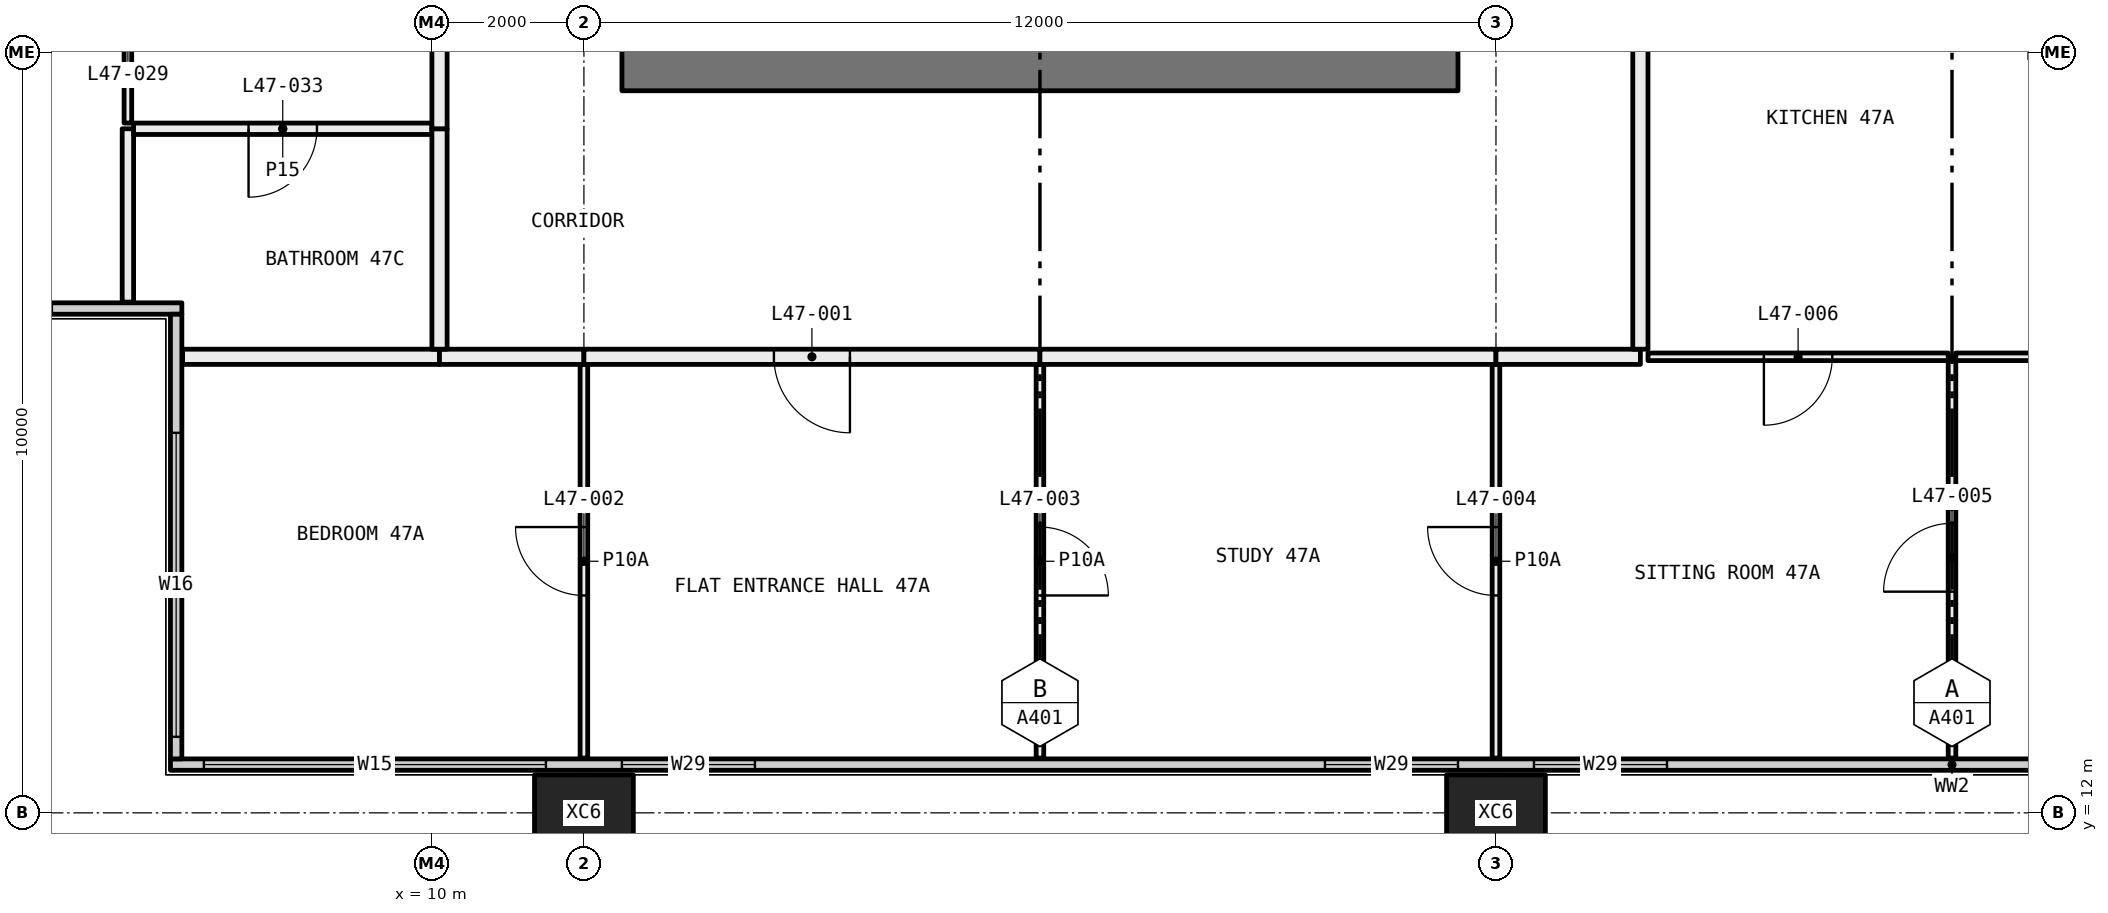
"""IFC4 building model, lengths in metres.
Left out: names, types, materials, properties, quantities, classifications, styles, units other than length and angle.
Written with IfcOpenShell. Run it as: python <this file> out.ifc"""

import sys

from ifc_helpers import new_model, si_unit, direction, frame, frame_2d, origin, origin_2d, place, context, subcontext, project, spatial, rectangle, hollow_rectangle, extrude, element, fill, save


model = new_model("IFC4")
c1 = context("Model", 3, precision=1e-05, world=origin(), true_north=direction((0.0, 1.0)))
c2 = subcontext(c1, "Body", "Model", "MODEL_VIEW")
j1 = project(units=[si_unit("LENGTHUNIT", "METRE"), si_unit("PLANEANGLEUNIT", "RADIAN")], contexts=[c1])
p1 = place(None, origin())
s1 = spatial("IfcSite", under=j1, at=p1, CompositionType="ELEMENT")
p2 = place(p1, origin())
s2 = spatial("IfcBuilding", under=s1, at=p2, CompositionType="ELEMENT")
p3 = place(p2, frame((0.0, 0.0, 178.95)))
s3 = spatial("IfcBuildingStorey", under=s2, at=p3, CompositionType="ELEMENT", Elevation=178.95)
for number, where, z_axis, x_axis in (
    (1, (12.0, 12.0, -0.4), (0.0, 0.0, 1.0), (1.0, 0.0, 0.0)),
    (2, (24.0, 12.0, -0.4), (0.0, 0.0, 1.0), (1.0, 0.0, 0.0)),
):
    element("IfcColumn", number, at=place(p3, frame(where, z_axis=z_axis, x_axis=x_axis)), inside=s3, PredefinedType="COLUMN", context=c2, shape_type="SweptSolid", body=[
        extrude(hollow_rectangle(XDim=1.3, YDim=1.0, WallThickness=0.05, at=origin_2d()), origin(), (0.0, 0.0, 1.0), 3.45),
    ])
p4 = place(p3, frame((6.56, 12.635, 0.0), z_axis=(0.0, 0.0, 1.0), x_axis=(1.0, 0.0, 0.0)))
e3 = element("IfcWall", 3, at=p4, inside=s3, PredefinedType="ELEMENTEDWALL", context=c2, shape_type="SweptSolid", body=[
    extrude(rectangle(XDim=46.88, YDim=0.15, at=frame_2d((23.44, 0.0))), origin(), (0.0, 0.0, 1.0), 3.05),
])
p5 = place(p4, frame((0.44, 0.0, 0.45)))
e4 = element("IfcOpeningElement", 4, at=p5, cuts=e3, PredefinedType="OPENING", context=c2, shape_type="SweptSolid", body=[
    extrude(rectangle(XDim=4.5, YDim=2.55, at=frame_2d((2.25, 1.275))), frame((0.0, 0.085, 0.0), z_axis=(0.0, -1.0, 0.0), x_axis=(1.0, 0.0, 0.0)), (0.0, 0.0, 1.0), 0.17),
])
p6 = place(p4, frame((5.94, 0.0, 0.45)))
e5 = element("IfcOpeningElement", 5, at=p6, cuts=e3, PredefinedType="OPENING", context=c2, shape_type="SweptSolid", body=[
    extrude(rectangle(XDim=1.75, YDim=2.55, at=frame_2d((0.875, 1.275))), frame((0.0, 0.085, 0.0), z_axis=(0.0, -1.0, 0.0), x_axis=(1.0, 0.0, 0.0)), (0.0, 0.0, 1.0), 0.17),
])
p7 = place(p4, frame((15.19, 0.0, 0.45)))
e6 = element("IfcOpeningElement", 6, at=p7, cuts=e3, PredefinedType="OPENING", context=c2, shape_type="SweptSolid", body=[
    extrude(rectangle(XDim=1.75, YDim=2.55, at=frame_2d((0.875, 1.275))), frame((0.0, 0.085, 0.0), z_axis=(0.0, -1.0, 0.0), x_axis=(1.0, 0.0, 0.0)), (0.0, 0.0, 1.0), 0.17),
])
p8 = place(p4, frame((17.94, 0.0, 0.45)))
e7 = element("IfcOpeningElement", 7, at=p8, cuts=e3, PredefinedType="OPENING", context=c2, shape_type="SweptSolid", body=[
    extrude(rectangle(XDim=1.75, YDim=2.55, at=frame_2d((0.875, 1.275))), frame((0.0, 0.085, 0.0), z_axis=(0.0, -1.0, 0.0), x_axis=(1.0, 0.0, 0.0)), (0.0, 0.0, 1.0), 0.17),
])
p9 = place(p4, frame((27.19, 0.0, 0.45)))
e8 = element("IfcOpeningElement", 8, at=p9, cuts=e3, PredefinedType="OPENING", context=c2, shape_type="SweptSolid", body=[
    extrude(rectangle(XDim=1.75, YDim=2.55, at=frame_2d((0.875, 1.275))), frame((0.0, 0.085, 0.0), z_axis=(0.0, -1.0, 0.0), x_axis=(1.0, 0.0, 0.0)), (0.0, 0.0, 1.0), 0.17),
])
p10 = place(p4, frame((29.94, 0.0, 0.45)))
e9 = element("IfcOpeningElement", 9, at=p10, cuts=e3, PredefinedType="OPENING", context=c2, shape_type="SweptSolid", body=[
    extrude(rectangle(XDim=1.75, YDim=2.55, at=frame_2d((0.875, 1.275))), frame((0.0, 0.085, 0.0), z_axis=(0.0, -1.0, 0.0), x_axis=(1.0, 0.0, 0.0)), (0.0, 0.0, 1.0), 0.17),
])
p11 = place(p4, frame((39.19, 0.0, 0.45)))
e10 = element("IfcOpeningElement", 10, at=p11, cuts=e3, PredefinedType="OPENING", context=c2, shape_type="SweptSolid", body=[
    extrude(rectangle(XDim=1.75, YDim=2.55, at=frame_2d((0.875, 1.275))), frame((0.0, 0.085, 0.0), z_axis=(0.0, -1.0, 0.0), x_axis=(1.0, 0.0, 0.0)), (0.0, 0.0, 1.0), 0.17),
])
p12 = place(p4, frame((41.94, 0.0, 0.45)))
e11 = element("IfcOpeningElement", 11, at=p12, cuts=e3, PredefinedType="OPENING", context=c2, shape_type="SweptSolid", body=[
    extrude(rectangle(XDim=4.5, YDim=2.55, at=frame_2d((2.25, 1.275))), frame((0.0, 0.085, 0.0), z_axis=(0.0, -1.0, 0.0), x_axis=(1.0, 0.0, 0.0)), (0.0, 0.0, 1.0), 0.17),
])
p13 = place(p3, frame((0.56, 18.635, 0.0), z_axis=(0.0, 0.0, 1.0), x_axis=(1.0, 0.0, 0.0)))
e12 = element("IfcWall", 12, at=p13, inside=s3, PredefinedType="ELEMENTEDWALL", context=c2, shape_type="SweptSolid", body=[
    extrude(rectangle(XDim=6.15, YDim=0.15, at=frame_2d((3.075, 0.0))), origin(), (0.0, 0.0, 1.0), 3.05),
])
p14 = place(p13, frame((0.44, 0.0, 0.45)))
e13 = element("IfcOpeningElement", 13, at=p14, cuts=e12, PredefinedType="OPENING", context=c2, shape_type="SweptSolid", body=[
    extrude(rectangle(XDim=4.0, YDim=2.55, at=frame_2d((2.0, 1.275))), frame((0.0, 0.085, 0.0), z_axis=(0.0, -1.0, 0.0), x_axis=(1.0, 0.0, 0.0)), (0.0, 0.0, 1.0), 0.17),
])
p15 = place(p3, frame((6.635, 12.71, 0.0), z_axis=(0.0, 0.0, 1.0), x_axis=(0.0, 1.0, 0.0)))
e14 = element("IfcWall", 14, at=p15, inside=s3, PredefinedType="ELEMENTEDWALL", context=c2, shape_type="SweptSolid", body=[
    extrude(rectangle(XDim=5.85, YDim=0.15, at=frame_2d((2.925, 0.0))), origin(), (0.0, 0.0, 1.0), 3.05),
])
p16 = place(p15, frame((0.29, 0.0, 0.45)))
e15 = element("IfcOpeningElement", 15, at=p16, cuts=e14, PredefinedType="OPENING", context=c2, shape_type="SweptSolid", body=[
    extrude(rectangle(XDim=4.0, YDim=2.55, at=frame_2d((2.0, 1.275))), frame((0.0, 0.085, 0.0), z_axis=(0.0, -1.0, 0.0), x_axis=(1.0, 0.0, 0.0)), (0.0, 0.0, 1.0), 0.17),
])
p17 = place(p3, frame((12.0, 12.72, 0.0), z_axis=(0.0, 0.0, 1.0), x_axis=(0.0, 1.0, 0.0)))
e16 = element("IfcWall", 16, at=p17, inside=s3, PredefinedType="PARTITIONING", context=c2, shape_type="SweptSolid", body=[
    extrude(rectangle(XDim=5.18, YDim=0.1, at=frame_2d((2.59, 0.0))), origin(), (0.0, 0.0, 1.0), 3.05),
])
p18 = place(p17, frame((2.14, 0.0, 0.0)))
e17 = element("IfcOpeningElement", 17, at=p18, cuts=e16, PredefinedType="OPENING", context=c2, shape_type="SweptSolid", body=[
    extrude(rectangle(XDim=0.9, YDim=2.1, at=frame_2d((0.45, 1.05))), frame((0.0, 0.06, 0.0), z_axis=(0.0, -1.0, 0.0), x_axis=(1.0, 0.0, 0.0)), (0.0, 0.0, 1.0), 0.12),
])
p19 = place(p3, frame((10.1, 18.0, 0.0), z_axis=(0.0, 0.0, 1.0), x_axis=(-1.0, 0.0, 0.0)))
e18 = element("IfcWall", 18, at=p19, inside=s3, PredefinedType="PARTITIONING", context=c2, shape_type="SweptSolid", body=[
    extrude(rectangle(XDim=3.38, YDim=0.2, at=frame_2d((1.69, 0.0))), origin(), (0.0, 0.0, 1.0), 3.05),
])
p20 = place(p3, frame((12.0, 18.0, 0.0), z_axis=(0.0, 0.0, 1.0), x_axis=(-1.0, 0.0, 0.0)))
e19 = element("IfcWall", 19, at=p20, inside=s3, PredefinedType="PARTITIONING", context=c2, shape_type="SweptSolid", body=[
    extrude(rectangle(XDim=1.9, YDim=0.2, at=frame_2d((0.95, 0.0))), origin(), (0.0, 0.0, 1.0), 3.05),
])
p21 = place(p3, frame((18.0, 12.72, 0.0), z_axis=(0.0, 0.0, 1.0), x_axis=(0.0, 1.0, 0.0)))
e20 = element("IfcWall", 20, at=p21, inside=s3, PredefinedType="PARTITIONING", context=c2, shape_type="SweptSolid", body=[
    extrude(rectangle(XDim=5.18, YDim=0.1, at=frame_2d((2.59, 0.0))), origin(), (0.0, 0.0, 1.0), 3.05),
])
p22 = place(p21, frame((2.14, 0.0, 0.0)))
e21 = element("IfcOpeningElement", 21, at=p22, cuts=e20, PredefinedType="OPENING", context=c2, shape_type="SweptSolid", body=[
    extrude(rectangle(XDim=0.9, YDim=2.1, at=frame_2d((0.45, 1.05))), frame((0.0, 0.06, 0.0), z_axis=(0.0, -1.0, 0.0), x_axis=(1.0, 0.0, 0.0)), (0.0, 0.0, 1.0), 0.12),
])
p23 = place(p3, frame((18.0, 18.0, 0.0), z_axis=(0.0, 0.0, 1.0), x_axis=(-1.0, 0.0, 0.0)))
e22 = element("IfcWall", 22, at=p23, inside=s3, PredefinedType="PARTITIONING", context=c2, shape_type="SweptSolid", body=[
    extrude(rectangle(XDim=6.0, YDim=0.2, at=frame_2d((3.0, 0.0))), origin(), (0.0, 0.0, 1.0), 3.05),
])
p24 = place(p23, frame((2.5, 0.0, 0.0)))
e23 = element("IfcOpeningElement", 23, at=p24, cuts=e22, PredefinedType="OPENING", context=c2, shape_type="SweptSolid", body=[
    extrude(rectangle(XDim=1.0, YDim=2.1, at=frame_2d((0.5, 1.05))), frame((0.0, 0.11, 0.0), z_axis=(0.0, -1.0, 0.0), x_axis=(1.0, 0.0, 0.0)), (0.0, 0.0, 1.0), 0.22),
])
p25 = place(p3, frame((24.0, 12.72, 0.0), z_axis=(0.0, 0.0, 1.0), x_axis=(0.0, 1.0, 0.0)))
e24 = element("IfcWall", 24, at=p25, inside=s3, PredefinedType="PARTITIONING", context=c2, shape_type="SweptSolid", body=[
    extrude(rectangle(XDim=5.18, YDim=0.1, at=frame_2d((2.59, 0.0))), origin(), (0.0, 0.0, 1.0), 3.05),
])
p26 = place(p25, frame((2.14, 0.0, 0.0)))
e25 = element("IfcOpeningElement", 25, at=p26, cuts=e24, PredefinedType="OPENING", context=c2, shape_type="SweptSolid", body=[
    extrude(rectangle(XDim=0.9, YDim=2.1, at=frame_2d((0.45, 1.05))), frame((0.0, 0.06, 0.0), z_axis=(0.0, -1.0, 0.0), x_axis=(1.0, 0.0, 0.0)), (0.0, 0.0, 1.0), 0.12),
])
p27 = place(p3, frame((24.0, 18.0, 0.0), z_axis=(0.0, 0.0, 1.0), x_axis=(-1.0, 0.0, 0.0)))
e26 = element("IfcWall", 26, at=p27, inside=s3, PredefinedType="PARTITIONING", context=c2, shape_type="SweptSolid", body=[
    extrude(rectangle(XDim=6.0, YDim=0.2, at=frame_2d((3.0, 0.0))), origin(), (0.0, 0.0, 1.0), 3.05),
])
p28 = place(p3, frame((30.0, 12.72, 0.0), z_axis=(0.0, 0.0, 1.0), x_axis=(0.0, 1.0, 0.0)))
e27 = element("IfcWall", 27, at=p28, inside=s3, PredefinedType="PARTITIONING", context=c2, shape_type="SweptSolid", body=[
    extrude(rectangle(XDim=5.28, YDim=0.1, at=frame_2d((2.64, 0.0))), origin(), (0.0, 0.0, 1.0), 3.05),
])
p29 = place(p28, frame((2.19, 0.0, 0.0)))
e28 = element("IfcOpeningElement", 28, at=p29, cuts=e27, PredefinedType="OPENING", context=c2, shape_type="SweptSolid", body=[
    extrude(rectangle(XDim=0.9, YDim=2.1, at=frame_2d((0.45, 1.05))), frame((0.0, 0.06, 0.0), z_axis=(0.0, -1.0, 0.0), x_axis=(1.0, 0.0, 0.0)), (0.0, 0.0, 1.0), 0.12),
])
p30 = place(p3, frame((29.95, 18.0, 0.0), z_axis=(0.0, 0.0, 1.0), x_axis=(-1.0, 0.0, 0.0)))
e29 = element("IfcWall", 29, at=p30, inside=s3, PredefinedType="PARTITIONING", context=c2, shape_type="SweptSolid", body=[
    extrude(rectangle(XDim=3.95, YDim=0.1, at=frame_2d((1.975, 0.0))), origin(), (0.0, 0.0, 1.0), 3.05),
])
p31 = place(p30, frame((1.525, 0.0, 0.0)))
e30 = element("IfcOpeningElement", 30, at=p31, cuts=e29, PredefinedType="OPENING", context=c2, shape_type="SweptSolid", body=[
    extrude(rectangle(XDim=0.9, YDim=2.1, at=frame_2d((0.45, 1.05))), frame((0.0, 0.06, 0.0), z_axis=(0.0, -1.0, 0.0), x_axis=(1.0, 0.0, 0.0)), (0.0, 0.0, 1.0), 0.12),
])
p32 = place(p3, frame((25.9, 18.0, 0.0), z_axis=(0.0, 0.0, 1.0), x_axis=(-1.0, 0.0, 0.0)))
e31 = element("IfcWall", 31, at=p32, inside=s3, PredefinedType="PARTITIONING", context=c2, shape_type="SweptSolid", body=[
    extrude(rectangle(XDim=1.9, YDim=0.2, at=frame_2d((0.95, 0.0))), origin(), (0.0, 0.0, 1.0), 3.05),
])
p33 = place(p3, frame((31.5, 18.0, 0.0), z_axis=(0.0, 0.0, 1.0), x_axis=(-1.0, 0.0, 0.0)))
e32 = element("IfcWall", 32, at=p33, inside=s3, PredefinedType="PARTITIONING", context=c2, shape_type="SweptSolid", body=[
    extrude(rectangle(XDim=1.45, YDim=0.1, at=frame_2d((0.725, 0.0))), origin(), (0.0, 0.0, 1.0), 3.05),
])
p34 = place(p3, frame((25.9, 23.9, 0.0), z_axis=(0.0, 0.0, 1.0), x_axis=(0.0, -1.0, 0.0)))
e33 = element("IfcWall", 33, at=p34, inside=s3, PredefinedType="PARTITIONING", context=c2, shape_type="SweptSolid", body=[
    extrude(rectangle(XDim=5.8, YDim=0.2, at=frame_2d((2.9, 0.0))), origin(), (0.0, 0.0, 1.0), 3.05),
])
p35 = place(p3, frame((6.0, 18.72, 0.0), z_axis=(0.0, 0.0, 1.0), x_axis=(0.0, 1.0, 0.0)))
e34 = element("IfcWall", 34, at=p35, inside=s3, PredefinedType="PARTITIONING", context=c2, shape_type="SweptSolid", body=[
    extrude(rectangle(XDim=2.28, YDim=0.15, at=frame_2d((1.14, 0.0))), origin(), (0.0, 0.0, 1.0), 3.05),
])
p36 = place(p3, frame((6.0, 21.075, 0.0), z_axis=(0.0, 0.0, 1.0), x_axis=(0.0, 1.0, 0.0)))
e35 = element("IfcWall", 35, at=p36, inside=s3, PredefinedType="PARTITIONING", context=c2, shape_type="SweptSolid", body=[
    extrude(rectangle(XDim=2.875, YDim=0.1, at=frame_2d((1.438, 0.0))), origin(), (0.0, 0.0, 1.0), 2.45),
])
p37 = place(p36, frame((0.988, 0.0, 0.0)))
e36 = element("IfcOpeningElement", 36, at=p37, cuts=e35, PredefinedType="OPENING", context=c2, shape_type="SweptSolid", body=[
    extrude(rectangle(XDim=0.9, YDim=2.1, at=frame_2d((0.45, 1.05))), frame((0.0, 0.06, 0.0), z_axis=(0.0, -1.0, 0.0), x_axis=(1.0, 0.0, 0.0)), (0.0, 0.0, 1.0), 0.12),
])
p38 = place(p3, frame((10.0, 21.0, 0.0), z_axis=(0.0, 0.0, 1.0), x_axis=(-1.0, 0.0, 0.0)))
e37 = element("IfcWall", 37, at=p38, inside=s3, PredefinedType="PARTITIONING", context=c2, shape_type="SweptSolid", body=[
    extrude(rectangle(XDim=3.925, YDim=0.15, at=frame_2d((1.962, 0.0))), origin(), (0.0, 0.0, 1.0), 3.05),
])
p39 = place(p38, frame((1.512, 0.0, 0.0)))
e38 = element("IfcOpeningElement", 38, at=p39, cuts=e37, PredefinedType="OPENING", context=c2, shape_type="SweptSolid", body=[
    extrude(rectangle(XDim=0.9, YDim=2.1, at=frame_2d((0.45, 1.05))), frame((0.0, 0.085, 0.0), z_axis=(0.0, -1.0, 0.0), x_axis=(1.0, 0.0, 0.0)), (0.0, 0.0, 1.0), 0.17),
])
p40 = place(p3, frame((10.1, 18.1, 0.0), z_axis=(0.0, 0.0, 1.0), x_axis=(0.0, 1.0, 0.0)))
e39 = element("IfcWall", 39, at=p40, inside=s3, PredefinedType="PARTITIONING", context=c2, shape_type="SweptSolid", body=[
    extrude(rectangle(XDim=2.9, YDim=0.2, at=frame_2d((1.45, 0.0))), origin(), (0.0, 0.0, 1.0), 3.05),
])
p41 = place(p3, frame((10.1, 21.0, 0.0), z_axis=(0.0, 0.0, 1.0), x_axis=(0.0, 1.0, 0.0)))
e40 = element("IfcWall", 40, at=p41, inside=s3, PredefinedType="PARTITIONING", context=c2, shape_type="SweptSolid", body=[
    extrude(rectangle(XDim=3.1, YDim=0.2, at=frame_2d((1.55, 0.0))), origin(), (0.0, 0.0, 1.0), 2.45),
])
p42 = place(p41, frame((1.05, 0.0, 0.0)))
e41 = element("IfcOpeningElement", 41, at=p42, cuts=e40, PredefinedType="OPENING", context=c2, shape_type="SweptSolid", body=[
    extrude(rectangle(XDim=1.0, YDim=2.1, at=frame_2d((0.5, 1.05))), frame((0.0, 0.11, 0.0), z_axis=(0.0, -1.0, 0.0), x_axis=(1.0, 0.0, 0.0)), (0.0, 0.0, 1.0), 0.22),
])
p43 = place(p3, frame((12.5, 21.775, 0.0), z_axis=(0.0, 0.0, 1.0), x_axis=(1.0, 0.0, 0.0)))
e42 = element("IfcWall", 42, at=p43, inside=s3, PredefinedType="SHEAR", context=c2, shape_type="SweptSolid", body=[
    extrude(rectangle(XDim=11.0, YDim=0.55, at=frame_2d((5.5, 0.0))), origin(), (0.0, 0.0, 1.0), 3.05),
])
p44 = place(p5, origin())
e43 = element("IfcWindow", 43, at=p44, inside=s3, PartitioningType="SINGLE_PANEL", PredefinedType="WINDOW", context=c2, shape_type="SweptSolid", body=[
    extrude(rectangle(XDim=4.5, YDim=2.55, at=frame_2d((2.25, 1.275))), frame((0.0, 0.03, 0.0), z_axis=(0.0, -1.0, 0.0), x_axis=(1.0, 0.0, 0.0)), (0.0, 0.0, 1.0), 0.06),
])
fill(e4, e43)
p45 = place(p6, origin())
e44 = element("IfcWindow", 44, at=p45, inside=s3, PartitioningType="SINGLE_PANEL", PredefinedType="WINDOW", context=c2, shape_type="SweptSolid", body=[
    extrude(rectangle(XDim=1.75, YDim=2.55, at=frame_2d((0.875, 1.275))), frame((0.0, 0.03, 0.0), z_axis=(0.0, -1.0, 0.0), x_axis=(1.0, 0.0, 0.0)), (0.0, 0.0, 1.0), 0.06),
])
fill(e5, e44)
p46 = place(p7, origin())
e45 = element("IfcWindow", 45, at=p46, inside=s3, PartitioningType="SINGLE_PANEL", PredefinedType="WINDOW", context=c2, shape_type="SweptSolid", body=[
    extrude(rectangle(XDim=1.75, YDim=2.55, at=frame_2d((0.875, 1.275))), frame((0.0, 0.03, 0.0), z_axis=(0.0, -1.0, 0.0), x_axis=(1.0, 0.0, 0.0)), (0.0, 0.0, 1.0), 0.06),
])
fill(e6, e45)
p47 = place(p8, origin())
e46 = element("IfcWindow", 46, at=p47, inside=s3, PartitioningType="SINGLE_PANEL", PredefinedType="WINDOW", context=c2, shape_type="SweptSolid", body=[
    extrude(rectangle(XDim=1.75, YDim=2.55, at=frame_2d((0.875, 1.275))), frame((0.0, 0.03, 0.0), z_axis=(0.0, -1.0, 0.0), x_axis=(1.0, 0.0, 0.0)), (0.0, 0.0, 1.0), 0.06),
])
fill(e7, e46)
p48 = place(p16, origin())
e47 = element("IfcWindow", 47, at=p48, inside=s3, PartitioningType="SINGLE_PANEL", PredefinedType="WINDOW", context=c2, shape_type="SweptSolid", body=[
    extrude(rectangle(XDim=4.0, YDim=2.55, at=frame_2d((2.0, 1.275))), frame((0.0, 0.03, 0.0), z_axis=(0.0, -1.0, 0.0), x_axis=(1.0, 0.0, 0.0)), (0.0, 0.0, 1.0), 0.06),
])
fill(e15, e47)
p49 = place(p24, origin())
e48 = element("IfcDoor", 48, at=p49, inside=s3, OperationType="SINGLE_SWING_RIGHT", PredefinedType="DOOR", context=c2, shape_type="SweptSolid", body=[
    extrude(rectangle(XDim=1.0, YDim=2.1, at=frame_2d((0.5, 1.05))), frame((0.0, 0.025, 0.0), z_axis=(0.0, -1.0, 0.0), x_axis=(1.0, 0.0, 0.0)), (0.0, 0.0, 1.0), 0.05),
])
fill(e23, e48)
p50 = place(p18, origin())
e49 = element("IfcDoor", 49, at=p50, inside=s3, OperationType="SINGLE_SWING_LEFT", PredefinedType="DOOR", context=c2, shape_type="SweptSolid", body=[
    extrude(rectangle(XDim=0.9, YDim=2.1, at=frame_2d((0.45, 1.05))), frame((0.0, 0.025, 0.0), z_axis=(0.0, -1.0, 0.0), x_axis=(1.0, 0.0, 0.0)), (0.0, 0.0, 1.0), 0.05),
])
fill(e17, e49)
p51 = place(p22, frame((0.9, 0.0, 0.0), x_axis=(-1.0, 0.0, 0.0)))
e50 = element("IfcDoor", 50, at=p51, inside=s3, OperationType="SINGLE_SWING_LEFT", PredefinedType="DOOR", context=c2, shape_type="SweptSolid", body=[
    extrude(rectangle(XDim=0.9, YDim=2.1, at=frame_2d((0.45, 1.05))), frame((0.0, 0.025, 0.0), z_axis=(0.0, -1.0, 0.0), x_axis=(1.0, 0.0, 0.0)), (0.0, 0.0, 1.0), 0.05),
])
fill(e21, e50)
p52 = place(p26, origin())
e51 = element("IfcDoor", 51, at=p52, inside=s3, OperationType="SINGLE_SWING_LEFT", PredefinedType="DOOR", context=c2, shape_type="SweptSolid", body=[
    extrude(rectangle(XDim=0.9, YDim=2.1, at=frame_2d((0.45, 1.05))), frame((0.0, 0.025, 0.0), z_axis=(0.0, -1.0, 0.0), x_axis=(1.0, 0.0, 0.0)), (0.0, 0.0, 1.0), 0.05),
])
fill(e25, e51)
p53 = place(p29, origin())
e52 = element("IfcDoor", 52, at=p53, inside=s3, OperationType="SINGLE_SWING_RIGHT", PredefinedType="DOOR", context=c2, shape_type="SweptSolid", body=[
    extrude(rectangle(XDim=0.9, YDim=2.1, at=frame_2d((0.45, 1.05))), frame((0.0, 0.025, 0.0), z_axis=(0.0, -1.0, 0.0), x_axis=(1.0, 0.0, 0.0)), (0.0, 0.0, 1.0), 0.05),
])
fill(e28, e52)
p54 = place(p31, origin())
e53 = element("IfcDoor", 53, at=p54, inside=s3, OperationType="SINGLE_SWING_LEFT", PredefinedType="DOOR", context=c2, shape_type="SweptSolid", body=[
    extrude(rectangle(XDim=0.9, YDim=2.1, at=frame_2d((0.45, 1.05))), frame((0.0, 0.025, 0.0), z_axis=(0.0, -1.0, 0.0), x_axis=(1.0, 0.0, 0.0)), (0.0, 0.0, 1.0), 0.05),
])
fill(e30, e53)
p55 = place(p39, origin())
e54 = element("IfcDoor", 54, at=p55, inside=s3, OperationType="SINGLE_SWING_LEFT", PredefinedType="DOOR", context=c2, shape_type="SweptSolid", body=[
    extrude(rectangle(XDim=0.9, YDim=2.1, at=frame_2d((0.45, 1.05))), frame((0.0, 0.025, 0.0), z_axis=(0.0, -1.0, 0.0), x_axis=(1.0, 0.0, 0.0)), (0.0, 0.0, 1.0), 0.05),
])
fill(e38, e54)
save(model, sys.argv[1])
